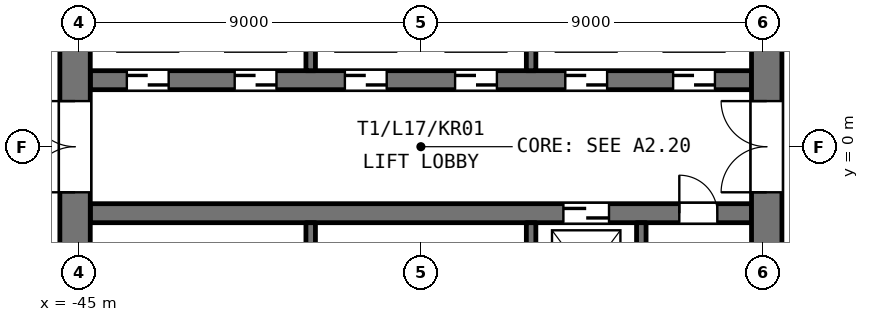
"""IFC4 building model, lengths in metres.
Left out: names, types, materials, properties, quantities, classifications, styles, units other than length and angle.
Written with IfcOpenShell. Run it as: python <this file> out.ifc"""

import sys

from ifc_helpers import new_model, si_unit, direction, frame, frame_2d, origin, place, context, subcontext, project, spatial, rectangle, extrude, element, fill, save


model = new_model("IFC4")
c1 = context("Model", 3, precision=1e-05, world=origin(), true_north=direction((0.0, 1.0)))
c2 = subcontext(c1, "Body", "Model", "MODEL_VIEW")
j1 = project(units=[si_unit("LENGTHUNIT", "METRE"), si_unit("PLANEANGLEUNIT", "RADIAN")], contexts=[c1])
p1 = place(None, origin())
s1 = spatial("IfcSite", under=j1, at=p1, CompositionType="ELEMENT")
p2 = place(p1, origin())
s2 = spatial("IfcBuilding", under=s1, at=p2, CompositionType="ELEMENT")
p3 = place(p2, frame((0.0, 0.0, 76.2)))
s3 = spatial("IfcBuildingStorey", under=s2, at=p3, CompositionType="ELEMENT", Elevation=76.2)
p4 = place(p3, frame((-44.7, -1.75, 0.0), z_axis=(0.0, 0.0, 1.0), x_axis=(1.0, 0.0, 0.0)))
e1 = element("IfcWall", 1, at=p4, inside=s3, PredefinedType="SHEAR", context=c2, shape_type="SweptSolid", body=[
    extrude(rectangle(XDim=17.4, YDim=0.5, at=frame_2d((8.7, 0.0))), origin(), (0.0, 0.0, 1.0), 3.6),
])
p5 = place(p4, frame((12.45, 0.0, 0.0)))
e2 = element("IfcOpeningElement", 2, at=p5, cuts=e1, PredefinedType="OPENING", context=c2, shape_type="SweptSolid", body=[
    extrude(rectangle(XDim=1.2, YDim=2.1, at=frame_2d((0.6, 1.05))), frame((0.0, 0.26, 0.0), z_axis=(0.0, -1.0, 0.0), x_axis=(1.0, 0.0, 0.0)), (0.0, 0.0, 1.0), 0.52),
])
p6 = place(p4, frame((15.5, 0.0, 0.0)))
e3 = element("IfcOpeningElement", 3, at=p6, cuts=e1, PredefinedType="OPENING", context=c2, shape_type="SweptSolid", body=[
    extrude(rectangle(XDim=1.0, YDim=2.1, at=frame_2d((0.5, 1.05))), frame((0.0, 0.26, 0.0), z_axis=(0.0, -1.0, 0.0), x_axis=(1.0, 0.0, 0.0)), (0.0, 0.0, 1.0), 0.52),
])
p7 = place(p3, frame((-44.7, 1.75, 0.0), z_axis=(0.0, 0.0, 1.0), x_axis=(1.0, 0.0, 0.0)))
e4 = element("IfcWall", 4, at=p7, inside=s3, PredefinedType="SHEAR", context=c2, shape_type="SweptSolid", body=[
    extrude(rectangle(XDim=17.4, YDim=0.5, at=frame_2d((8.7, 0.0))), origin(), (0.0, 0.0, 1.0), 3.6),
])
p8 = place(p7, frame((0.962, 0.0, 0.0)))
e5 = element("IfcOpeningElement", 5, at=p8, cuts=e4, PredefinedType="OPENING", context=c2, shape_type="SweptSolid", body=[
    extrude(rectangle(XDim=1.1, YDim=2.1, at=frame_2d((0.55, 1.05))), frame((0.0, 0.26, 0.0), z_axis=(0.0, -1.0, 0.0), x_axis=(1.0, 0.0, 0.0)), (0.0, 0.0, 1.0), 0.52),
])
p9 = place(p7, frame((3.8, 0.0, 0.0)))
e6 = element("IfcOpeningElement", 6, at=p9, cuts=e4, PredefinedType="OPENING", context=c2, shape_type="SweptSolid", body=[
    extrude(rectangle(XDim=1.1, YDim=2.1, at=frame_2d((0.55, 1.05))), frame((0.0, 0.26, 0.0), z_axis=(0.0, -1.0, 0.0), x_axis=(1.0, 0.0, 0.0)), (0.0, 0.0, 1.0), 0.52),
])
p10 = place(p7, frame((6.7, 0.0, 0.0)))
e7 = element("IfcOpeningElement", 7, at=p10, cuts=e4, PredefinedType="OPENING", context=c2, shape_type="SweptSolid", body=[
    extrude(rectangle(XDim=1.1, YDim=2.1, at=frame_2d((0.55, 1.05))), frame((0.0, 0.26, 0.0), z_axis=(0.0, -1.0, 0.0), x_axis=(1.0, 0.0, 0.0)), (0.0, 0.0, 1.0), 0.52),
])
p11 = place(p7, frame((9.6, 0.0, 0.0)))
e8 = element("IfcOpeningElement", 8, at=p11, cuts=e4, PredefinedType="OPENING", context=c2, shape_type="SweptSolid", body=[
    extrude(rectangle(XDim=1.1, YDim=2.1, at=frame_2d((0.55, 1.05))), frame((0.0, 0.26, 0.0), z_axis=(0.0, -1.0, 0.0), x_axis=(1.0, 0.0, 0.0)), (0.0, 0.0, 1.0), 0.52),
])
p12 = place(p7, frame((12.5, 0.0, 0.0)))
e9 = element("IfcOpeningElement", 9, at=p12, cuts=e4, PredefinedType="OPENING", context=c2, shape_type="SweptSolid", body=[
    extrude(rectangle(XDim=1.1, YDim=2.1, at=frame_2d((0.55, 1.05))), frame((0.0, 0.26, 0.0), z_axis=(0.0, -1.0, 0.0), x_axis=(1.0, 0.0, 0.0)), (0.0, 0.0, 1.0), 0.52),
])
p13 = place(p7, frame((15.337, 0.0, 0.0)))
e10 = element("IfcOpeningElement", 10, at=p13, cuts=e4, PredefinedType="OPENING", context=c2, shape_type="SweptSolid", body=[
    extrude(rectangle(XDim=1.1, YDim=2.1, at=frame_2d((0.55, 1.05))), frame((0.0, 0.26, 0.0), z_axis=(0.0, -1.0, 0.0), x_axis=(1.0, 0.0, 0.0)), (0.0, 0.0, 1.0), 0.52),
])
p14 = place(p3, frame((-45.1, -9.5, 0.0), z_axis=(0.0, 0.0, 1.0), x_axis=(0.0, 1.0, 0.0)))
e11 = element("IfcWall", 11, at=p14, inside=s3, PredefinedType="SHEAR", context=c2, shape_type="SweptSolid", body=[
    extrude(rectangle(XDim=19.0, YDim=0.8, at=frame_2d((9.5, 0.0))), origin(), (0.0, 0.0, 1.0), 3.6),
])
p15 = place(p14, frame((8.3, 0.0, 0.0)))
e12 = element("IfcOpeningElement", 12, at=p15, cuts=e11, PredefinedType="OPENING", context=c2, shape_type="SweptSolid", body=[
    extrude(rectangle(XDim=2.4, YDim=2.1, at=frame_2d((1.2, 1.05))), frame((0.0, 0.41, 0.0), z_axis=(0.0, -1.0, 0.0), x_axis=(1.0, 0.0, 0.0)), (0.0, 0.0, 1.0), 0.82),
])
for number, where, z_axis, x_axis in (
    (13, (-38.9, -4.625, 0.0), (0.0, 0.0, 1.0), (0.0, 1.0, 0.0)),
    (14, (-38.9, 2.0, 0.0), (0.0, 0.0, 1.0), (0.0, 1.0, 0.0)),
    (15, (-33.1, -4.625, 0.0), (0.0, 0.0, 1.0), (0.0, 1.0, 0.0)),
    (16, (-33.1, 2.0, 0.0), (0.0, 0.0, 1.0), (0.0, 1.0, 0.0)),
    (17, (-30.2, -4.625, 0.0), (0.0, 0.0, 1.0), (0.0, 1.0, 0.0)),
):
    element("IfcWall", number, at=place(p3, frame(where, z_axis=z_axis, x_axis=x_axis)), inside=s3, PredefinedType="SHEAR", context=c2, shape_type="SweptSolid", body=[
        extrude(rectangle(XDim=2.625, YDim=0.25, at=frame_2d((1.312, 0.0))), origin(), (0.0, 0.0, 1.0), 3.6),
    ])
p16 = place(p3, frame((-26.9, -9.5, 0.0), z_axis=(0.0, 0.0, 1.0), x_axis=(0.0, 1.0, 0.0)))
e18 = element("IfcWall", 18, at=p16, inside=s3, PredefinedType="SHEAR", context=c2, shape_type="SweptSolid", body=[
    extrude(rectangle(XDim=19.0, YDim=0.8, at=frame_2d((9.5, 0.0))), origin(), (0.0, 0.0, 1.0), 3.6),
])
p17 = place(p16, frame((8.3, 0.0, 0.0)))
e19 = element("IfcOpeningElement", 19, at=p17, cuts=e18, PredefinedType="OPENING", context=c2, shape_type="SweptSolid", body=[
    extrude(rectangle(XDim=2.4, YDim=2.1, at=frame_2d((1.2, 1.05))), frame((0.0, 0.41, 0.0), z_axis=(0.0, -1.0, 0.0), x_axis=(1.0, 0.0, 0.0)), (0.0, 0.0, 1.0), 0.82),
])
p18 = place(p15, origin())
e20 = element("IfcDoor", 20, at=p18, inside=s3, OperationType="DOUBLE_DOOR_SINGLE_SWING", PredefinedType="DOOR", context=c2, shape_type="SweptSolid", body=[
    extrude(rectangle(XDim=2.4, YDim=2.1, at=frame_2d((1.2, 1.05))), frame((0.0, -0.225, 0.0), z_axis=(0.0, -1.0, 0.0), x_axis=(1.0, 0.0, 0.0)), (0.0, 0.0, 1.0), 0.05),
])
fill(e12, e20)
p19 = place(p17, origin())
e21 = element("IfcDoor", 21, at=p19, inside=s3, OperationType="DOUBLE_DOOR_SINGLE_SWING", PredefinedType="DOOR", context=c2, shape_type="SweptSolid", body=[
    extrude(rectangle(XDim=2.4, YDim=2.1, at=frame_2d((1.2, 1.05))), frame((0.0, 0.275, 0.0), z_axis=(0.0, -1.0, 0.0), x_axis=(1.0, 0.0, 0.0)), (0.0, 0.0, 1.0), 0.05),
])
fill(e19, e21)
p20 = place(p8, origin())
e22 = element("IfcDoor", 22, at=p20, inside=s3, OperationType="SLIDING_TO_LEFT", PredefinedType="DOOR", context=c2, shape_type="SweptSolid", body=[
    extrude(rectangle(XDim=1.1, YDim=2.1, at=frame_2d((0.55, 1.05))), frame((0.0, 0.025, 0.0), z_axis=(0.0, -1.0, 0.0), x_axis=(1.0, 0.0, 0.0)), (0.0, 0.0, 1.0), 0.05),
])
fill(e5, e22)
p21 = place(p9, origin())
e23 = element("IfcDoor", 23, at=p21, inside=s3, OperationType="SLIDING_TO_LEFT", PredefinedType="DOOR", context=c2, shape_type="SweptSolid", body=[
    extrude(rectangle(XDim=1.1, YDim=2.1, at=frame_2d((0.55, 1.05))), frame((0.0, 0.025, 0.0), z_axis=(0.0, -1.0, 0.0), x_axis=(1.0, 0.0, 0.0)), (0.0, 0.0, 1.0), 0.05),
])
fill(e6, e23)
p22 = place(p10, origin())
e24 = element("IfcDoor", 24, at=p22, inside=s3, OperationType="SLIDING_TO_LEFT", PredefinedType="DOOR", context=c2, shape_type="SweptSolid", body=[
    extrude(rectangle(XDim=1.1, YDim=2.1, at=frame_2d((0.55, 1.05))), frame((0.0, 0.025, 0.0), z_axis=(0.0, -1.0, 0.0), x_axis=(1.0, 0.0, 0.0)), (0.0, 0.0, 1.0), 0.05),
])
fill(e7, e24)
p23 = place(p11, origin())
e25 = element("IfcDoor", 25, at=p23, inside=s3, OperationType="SLIDING_TO_LEFT", PredefinedType="DOOR", context=c2, shape_type="SweptSolid", body=[
    extrude(rectangle(XDim=1.1, YDim=2.1, at=frame_2d((0.55, 1.05))), frame((0.0, 0.025, 0.0), z_axis=(0.0, -1.0, 0.0), x_axis=(1.0, 0.0, 0.0)), (0.0, 0.0, 1.0), 0.05),
])
fill(e8, e25)
p24 = place(p12, origin())
e26 = element("IfcDoor", 26, at=p24, inside=s3, OperationType="SLIDING_TO_LEFT", PredefinedType="DOOR", context=c2, shape_type="SweptSolid", body=[
    extrude(rectangle(XDim=1.1, YDim=2.1, at=frame_2d((0.55, 1.05))), frame((0.0, 0.025, 0.0), z_axis=(0.0, -1.0, 0.0), x_axis=(1.0, 0.0, 0.0)), (0.0, 0.0, 1.0), 0.05),
])
fill(e9, e26)
p25 = place(p13, origin())
e27 = element("IfcDoor", 27, at=p25, inside=s3, OperationType="SLIDING_TO_LEFT", PredefinedType="DOOR", context=c2, shape_type="SweptSolid", body=[
    extrude(rectangle(XDim=1.1, YDim=2.1, at=frame_2d((0.55, 1.05))), frame((0.0, 0.025, 0.0), z_axis=(0.0, -1.0, 0.0), x_axis=(1.0, 0.0, 0.0)), (0.0, 0.0, 1.0), 0.05),
])
fill(e10, e27)
p26 = place(p5, origin())
e28 = element("IfcDoor", 28, at=p26, inside=s3, OperationType="SLIDING_TO_LEFT", PredefinedType="DOOR", context=c2, shape_type="SweptSolid", body=[
    extrude(rectangle(XDim=1.2, YDim=2.1, at=frame_2d((0.6, 1.05))), frame((0.0, 0.025, 0.0), z_axis=(0.0, -1.0, 0.0), x_axis=(1.0, 0.0, 0.0)), (0.0, 0.0, 1.0), 0.05),
])
fill(e2, e28)
p27 = place(p6, origin())
e29 = element("IfcDoor", 29, at=p27, inside=s3, OperationType="SINGLE_SWING_LEFT", PredefinedType="DOOR", context=c2, shape_type="SweptSolid", body=[
    extrude(rectangle(XDim=1.0, YDim=2.1, at=frame_2d((0.5, 1.05))), frame((0.0, 0.025, 0.0), z_axis=(0.0, -1.0, 0.0), x_axis=(1.0, 0.0, 0.0)), (0.0, 0.0, 1.0), 0.05),
])
fill(e3, e29)
save(model, sys.argv[1])
